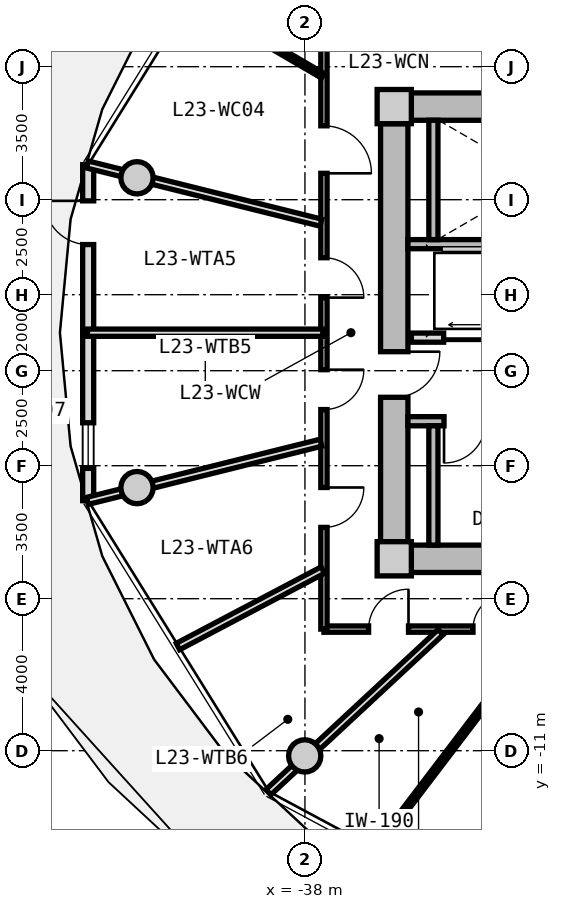
"""IFC4 building model, lengths in metres.
Left out: names, types, materials, properties, quantities, classifications, styles, units other than length and angle.
Written with IfcOpenShell. Run it as: python <this file> out.ifc"""

import sys

from ifc_helpers import new_model, si_unit, direction, frame, frame_2d, origin, origin_2d, place, context, subcontext, project, spatial, rectangle, circle, extrude, source, transform, mapped, element, fill, save


model = new_model("IFC4")
c1 = context("Model", 3, precision=1e-05, world=origin(), true_north=direction((0.0, 1.0)))
c2 = subcontext(c1, "Body", "Model", "MODEL_VIEW")
j1 = project(units=[si_unit("LENGTHUNIT", "METRE"), si_unit("PLANEANGLEUNIT", "RADIAN")], contexts=[c1])
p1 = place(None, origin())
s1 = spatial("IfcSite", under=j1, at=p1, CompositionType="ELEMENT")
p2 = place(p1, origin())
s2 = spatial("IfcBuilding", under=s1, at=p2, CompositionType="ELEMENT")
p3 = place(p2, frame((0.0, 0.0, 77.95)))
s3 = spatial("IfcBuildingStorey", under=s2, at=p3, CompositionType="ELEMENT", Elevation=77.95)
m1 = source(origin(), c2, "Body", "SweptSolid", [
    extrude(rectangle(XDim=0.9, YDim=0.9, at=origin_2d()), origin(), (0.0, 0.0, 1.0), 3.05),
])
for number, where, z_axis, x_axis in (
    (1, (-35.65, -5.95, 0.0), (0.0, 0.0, 1.0), (1.0, 0.0, 0.0)),
    (2, (-35.65, 5.95, 0.0), (0.0, 0.0, 1.0), (1.0, 0.0, 0.0)),
):
    element("IfcColumn", number, at=place(p3, frame(where, z_axis=z_axis, x_axis=x_axis)), inside=s3, PredefinedType="COLUMN", context=c2, shape_type="MappedRepresentation", body=[
        mapped(m1, transform((0.0, 0.0, 0.0), x_axis=(1.0, 0.0, 0.0), y_axis=(0.0, 1.0, 0.0), z_axis=(0.0, 0.0, 1.0), scale=1.0)),
    ])
m2 = source(origin(), c2, "Body", "SweptSolid", [
    extrude(rectangle(XDim=14.4, YDim=0.72, at=frame_2d((7.2, 0.0))), origin(), (0.0, 0.0, 1.0), 2.79),
])
for number, where, z_axis, x_axis in (
    (3, (-35.2, 5.95, 0.0), (0.0, 0.0, 1.0), (1.0, 0.0, 0.0)),
    (4, (-20.8, -5.95, 0.0), (0.0, 0.0, 1.0), (-1.0, 0.0, 0.0)),
):
    element("IfcWall", number, at=place(p3, frame(where, z_axis=z_axis, x_axis=x_axis)), inside=s3, PredefinedType="SHEAR", context=c2, shape_type="MappedRepresentation", body=[
        mapped(m2, transform((0.0, 0.0, 0.0), x_axis=(1.0, 0.0, 0.0), y_axis=(0.0, 1.0, 0.0), z_axis=(0.0, 0.0, 1.0), scale=1.0)),
    ])
m3 = source(origin(), c2, "Body", "SweptSolid", [
    extrude(rectangle(XDim=11.0, YDim=0.72, at=frame_2d((5.5, 0.0))), origin(), (0.0, 0.0, 1.0), 2.79),
])
p4 = place(p3, frame((-35.65, -5.5, 0.0), z_axis=(0.0, 0.0, 1.0), x_axis=(0.0, 1.0, 0.0)))
e5 = element("IfcWall", 5, at=p4, inside=s3, PredefinedType="SHEAR", context=c2, shape_type="MappedRepresentation", body=[
    mapped(m3, transform((0.0, 0.0, 0.0), x_axis=(1.0, 0.0, 0.0), y_axis=(0.0, 1.0, 0.0), z_axis=(0.0, 0.0, 1.0), scale=1.0)),
])
p5 = place(p4, frame((3.8, 0.0, 0.0)))
e6 = element("IfcOpeningElement", 6, at=p5, cuts=e5, PredefinedType="OPENING", context=c2, shape_type="SweptSolid", body=[
    extrude(rectangle(XDim=1.2, YDim=2.15, at=frame_2d((0.6, 1.075))), frame((0.0, 0.37, 0.0), z_axis=(0.0, -1.0, 0.0), x_axis=(1.0, 0.0, 0.0)), (0.0, 0.0, 1.0), 0.74),
])
m4 = source(origin(), c2, "Body", "SweptSolid", [
    extrude(circle(Radius=0.425, at=origin_2d()), origin(), (0.0, 0.0, 1.0), 3.47),
])
for number, where, z_axis, x_axis in (
    (7, (-42.419, 4.076, -0.42), (0.0, 0.0, 1.0), (1.0, 0.0, 0.0)),
    (8, (-42.419, -4.076, -0.42), (0.0, 0.0, 1.0), (1.0, 0.0, 0.0)),
    (9, (-38.006, -11.137, -0.42), (0.0, 0.0, 1.0), (1.0, 0.0, 0.0)),
):
    element("IfcColumn", number, at=place(p3, frame(where, z_axis=z_axis, x_axis=x_axis)), inside=s3, PredefinedType="COLUMN", context=c2, shape_type="MappedRepresentation", body=[
        mapped(m4, transform((0.0, 0.0, 0.0), x_axis=(1.0, 0.0, 0.0), y_axis=(0.0, 1.0, 0.0), z_axis=(0.0, 0.0, 1.0), scale=1.0)),
    ])
m5 = source(origin(), c2, "Body", "SweptSolid", [
    extrude(rectangle(XDim=8.841, YDim=0.29, at=frame_2d((4.421, 0.0))), origin(), (0.0, 0.0, 1.0), 2.79),
])
p6 = place(p3, frame((-43.704, -4.421, 0.0), z_axis=(0.0, 0.0, 1.0), x_axis=(0.0, 1.0, 0.0)))
e10 = element("IfcWall", 10, at=p6, inside=s3, PredefinedType="SOLIDWALL", context=c2, shape_type="MappedRepresentation", body=[
    mapped(m5, transform((0.0, 0.0, 0.0), x_axis=(1.0, 0.0, 0.0), y_axis=(0.0, 1.0, 0.0), z_axis=(0.0, 0.0, 1.0), scale=1.0)),
])
p7 = place(p6, frame((6.74, 0.0, 0.0)))
e11 = element("IfcOpeningElement", 11, at=p7, cuts=e10, PredefinedType="OPENING", context=c2, shape_type="SweptSolid", body=[
    extrude(rectangle(XDim=1.15, YDim=2.25, at=frame_2d((0.575, 1.125))), frame((0.0, 0.155, 0.0), z_axis=(0.0, -1.0, 0.0), x_axis=(1.0, 0.0, 0.0)), (0.0, 0.0, 1.0), 0.31),
])
p8 = place(p6, frame((0.85, 0.0, 0.85)))
e12 = element("IfcOpeningElement", 12, at=p8, cuts=e10, PredefinedType="OPENING", context=c2, shape_type="SweptSolid", body=[
    extrude(rectangle(XDim=1.2, YDim=1.5, at=frame_2d((0.6, 0.75))), frame((0.0, 0.155, 0.0), z_axis=(0.0, -1.0, 0.0), x_axis=(1.0, 0.0, 0.0)), (0.0, 0.0, 1.0), 0.31),
])
m6 = source(origin(), c2, "Body", "SweptSolid", [
    extrude(rectangle(XDim=7.83, YDim=0.24, at=frame_2d((3.915, 0.0))), origin(), (0.0, 0.0, 1.0), 2.79),
])
p9 = place(p3, frame((-35.29, 2.33, 0.0), z_axis=(0.0, 0.0, 1.0), x_axis=(1.0, 0.0, 0.0)))
e13 = element("IfcWall", 13, at=p9, inside=s3, PredefinedType="PARTITIONING", context=c2, shape_type="MappedRepresentation", body=[
    mapped(m6, transform((0.0, 0.0, 0.0), x_axis=(1.0, 0.0, 0.0), y_axis=(0.0, 1.0, 0.0), z_axis=(0.0, 0.0, 1.0), scale=1.0)),
])
m7 = source(origin(), c2, "Body", "SweptSolid", [
    extrude(rectangle(XDim=3.14, YDim=0.24, at=frame_2d((1.57, 0.0))), origin(), (0.0, 0.0, 1.0), 2.79),
])
p10 = place(p3, frame((-34.62, 2.45, 0.0), z_axis=(0.0, 0.0, 1.0), x_axis=(0.0, 1.0, 0.0)))
e14 = element("IfcWall", 14, at=p10, inside=s3, PredefinedType="PARTITIONING", context=c2, shape_type="MappedRepresentation", body=[
    mapped(m7, transform((0.0, 0.0, 0.0), x_axis=(1.0, 0.0, 0.0), y_axis=(0.0, 1.0, 0.0), z_axis=(0.0, 0.0, 1.0), scale=1.0)),
])
p11 = place(p3, frame((-35.29, -2.33, 0.0), z_axis=(0.0, 0.0, 1.0), x_axis=(1.0, 0.0, 0.0)))
e15 = element("IfcWall", 15, at=p11, inside=s3, PredefinedType="PARTITIONING", context=c2, shape_type="MappedRepresentation", body=[
    mapped(m6, transform((0.0, 0.0, 0.0), x_axis=(1.0, 0.0, 0.0), y_axis=(0.0, 1.0, 0.0), z_axis=(0.0, 0.0, 1.0), scale=1.0)),
])
p12 = place(p11, frame((0.95, 0.0, 0.0)))
e16 = element("IfcOpeningElement", 16, at=p12, cuts=e15, PredefinedType="OPENING", context=c2, shape_type="SweptSolid", body=[
    extrude(rectangle(XDim=1.1, YDim=2.15, at=frame_2d((0.55, 1.075))), frame((0.0, 0.13, 0.0), z_axis=(0.0, -1.0, 0.0), x_axis=(1.0, 0.0, 0.0)), (0.0, 0.0, 1.0), 0.26),
])
p13 = place(p3, frame((-34.62, -5.59, 0.0), z_axis=(0.0, 0.0, 1.0), x_axis=(0.0, 1.0, 0.0)))
e17 = element("IfcWall", 17, at=p13, inside=s3, PredefinedType="PARTITIONING", context=c2, shape_type="MappedRepresentation", body=[
    mapped(m7, transform((0.0, 0.0, 0.0), x_axis=(1.0, 0.0, 0.0), y_axis=(0.0, 1.0, 0.0), z_axis=(0.0, 0.0, 1.0), scale=1.0)),
])
m8 = source(origin(), c2, "Body", "SweptSolid", [
    extrude(rectangle(XDim=7.62, YDim=0.24, at=frame_2d((3.81, 0.0))), origin(), (0.0, 0.0, 1.0), 2.775),
])
p14 = place(p3, frame((-35.2, -0.13, 0.0), z_axis=(0.0, 0.0, 1.0), x_axis=(1.0, 0.0, 0.0)))
e18 = element("IfcWall", 18, at=p14, inside=s3, PredefinedType="PARTITIONING", context=c2, shape_type="MappedRepresentation", body=[
    mapped(m8, transform((0.0, 0.0, 0.0), x_axis=(1.0, 0.0, 0.0), y_axis=(0.0, 1.0, 0.0), z_axis=(0.0, 0.0, 1.0), scale=1.0)),
])
p15 = place(p14, frame((6.22, 0.0, 0.0)))
e19 = element("IfcOpeningElement", 19, at=p15, cuts=e18, PredefinedType="OPENING", context=c2, shape_type="SweptSolid", body=[
    extrude(rectangle(XDim=1.0, YDim=2.1, at=frame_2d((0.5, 1.05))), frame((0.0, 0.13, 0.0), z_axis=(0.0, -1.0, 0.0), x_axis=(1.0, 0.0, 0.0)), (0.0, 0.0, 1.0), 0.26),
])
p16 = place(p14, frame((0.85, 0.0, 0.0)))
e20 = element("IfcOpeningElement", 20, at=p16, cuts=e18, PredefinedType="OPENING", context=c2, shape_type="SweptSolid", body=[
    extrude(rectangle(XDim=1.1, YDim=2.2, at=frame_2d((0.55, 1.1))), frame((0.0, 0.13, 0.0), z_axis=(0.0, -1.0, 0.0), x_axis=(1.0, 0.0, 0.0)), (0.0, 0.0, 1.0), 0.26),
])
p17 = place(p14, frame((3.85, 0.0, 0.0)))
e21 = element("IfcOpeningElement", 21, at=p17, cuts=e18, PredefinedType="OPENING", context=c2, shape_type="SweptSolid", body=[
    extrude(rectangle(XDim=1.1, YDim=2.2, at=frame_2d((0.55, 1.1))), frame((0.0, 0.13, 0.0), z_axis=(0.0, -1.0, 0.0), x_axis=(1.0, 0.0, 0.0)), (0.0, 0.0, 1.0), 0.26),
])
m9 = source(origin(), c2, "Body", "SweptSolid", [
    extrude(rectangle(XDim=19.0, YDim=0.165, at=frame_2d((9.5, 0.0))), origin(), (0.0, 0.0, 1.0), 2.775),
])
p18 = place(p3, frame((-18.5, -7.8, 0.0), z_axis=(0.0, 0.0, 1.0), x_axis=(-1.0, 0.0, 0.0)))
e22 = element("IfcWall", 22, at=p18, inside=s3, PredefinedType="PARTITIONING", context=c2, shape_type="MappedRepresentation", body=[
    mapped(m9, transform((0.0, 0.0, 0.0), x_axis=(1.0, 0.0, 0.0), y_axis=(0.0, 1.0, 0.0), z_axis=(0.0, 0.0, 1.0), scale=1.0)),
])
p19 = place(p18, frame((14.158, 0.0, 0.0)))
e23 = element("IfcOpeningElement", 23, at=p19, cuts=e22, PredefinedType="OPENING", context=c2, shape_type="SweptSolid", body=[
    extrude(rectangle(XDim=0.92, YDim=2.1, at=frame_2d((0.46, 1.05))), frame((0.0, 0.093, 0.0), z_axis=(0.0, -1.0, 0.0), x_axis=(1.0, 0.0, 0.0)), (0.0, 0.0, 1.0), 0.185),
])
p20 = place(p18, frame((11.01, 0.0, 0.0)))
e24 = element("IfcOpeningElement", 24, at=p20, cuts=e22, PredefinedType="OPENING", context=c2, shape_type="SweptSolid", body=[
    extrude(rectangle(XDim=0.92, YDim=2.1, at=frame_2d((0.46, 1.05))), frame((0.0, 0.093, 0.0), z_axis=(0.0, -1.0, 0.0), x_axis=(1.0, 0.0, 0.0)), (0.0, 0.0, 1.0), 0.185),
])
p21 = place(p18, frame((6.825, 0.0, 0.0)))
e25 = element("IfcOpeningElement", 25, at=p21, cuts=e22, PredefinedType="OPENING", context=c2, shape_type="SweptSolid", body=[
    extrude(rectangle(XDim=1.25, YDim=2.2, at=frame_2d((0.625, 1.1))), frame((0.0, 0.093, 0.0), z_axis=(0.0, -1.0, 0.0), x_axis=(1.0, 0.0, 0.0)), (0.0, 0.0, 1.0), 0.185),
])
p22 = place(p18, frame((2.106, 0.0, 0.0)))
e26 = element("IfcOpeningElement", 26, at=p22, cuts=e22, PredefinedType="OPENING", context=c2, shape_type="SweptSolid", body=[
    extrude(rectangle(XDim=1.25, YDim=2.2, at=frame_2d((0.625, 1.1))), frame((0.0, 0.093, 0.0), z_axis=(0.0, -1.0, 0.0), x_axis=(1.0, 0.0, 0.0)), (0.0, 0.0, 1.0), 0.185),
])
p23 = place(p18, frame((16.775, 0.0, 0.0)))
e27 = element("IfcOpeningElement", 27, at=p23, cuts=e22, PredefinedType="OPENING", context=c2, shape_type="SweptSolid", body=[
    extrude(rectangle(XDim=1.05, YDim=2.15, at=frame_2d((0.525, 1.075))), frame((0.0, 0.093, 0.0), z_axis=(0.0, -1.0, 0.0), x_axis=(1.0, 0.0, 0.0)), (0.0, 0.0, 1.0), 0.185),
])
m10 = source(origin(), c2, "Body", "SweptSolid", [
    extrude(rectangle(XDim=15.6, YDim=0.165, at=frame_2d((7.8, 0.0))), origin(), (0.0, 0.0, 1.0), 2.775),
])
p24 = place(p3, frame((-37.5, -7.8, 0.0), z_axis=(0.0, 0.0, 1.0), x_axis=(0.0, 1.0, 0.0)))
e28 = element("IfcWall", 28, at=p24, inside=s3, PredefinedType="PARTITIONING", context=c2, shape_type="MappedRepresentation", body=[
    mapped(m10, transform((0.0, 0.0, 0.0), x_axis=(1.0, 0.0, 0.0), y_axis=(0.0, 1.0, 0.0), z_axis=(0.0, 0.0, 1.0), scale=1.0)),
])
p25 = place(p24, frame((11.994, 0.0, 0.0)))
e29 = element("IfcOpeningElement", 29, at=p25, cuts=e28, PredefinedType="OPENING", context=c2, shape_type="SweptSolid", body=[
    extrude(rectangle(XDim=1.25, YDim=2.2, at=frame_2d((0.625, 1.1))), frame((0.0, 0.093, 0.0), z_axis=(0.0, -1.0, 0.0), x_axis=(1.0, 0.0, 0.0)), (0.0, 0.0, 1.0), 0.185),
])
p26 = place(p24, frame((8.723, 0.0, 0.0)))
e30 = element("IfcOpeningElement", 30, at=p26, cuts=e28, PredefinedType="OPENING", context=c2, shape_type="SweptSolid", body=[
    extrude(rectangle(XDim=1.05, YDim=2.15, at=frame_2d((0.525, 1.075))), frame((0.0, 0.093, 0.0), z_axis=(0.0, -1.0, 0.0), x_axis=(1.0, 0.0, 0.0)), (0.0, 0.0, 1.0), 0.185),
])
p27 = place(p24, frame((5.777, 0.0, 0.0)))
e31 = element("IfcOpeningElement", 31, at=p27, cuts=e28, PredefinedType="OPENING", context=c2, shape_type="SweptSolid", body=[
    extrude(rectangle(XDim=1.05, YDim=2.15, at=frame_2d((0.525, 1.075))), frame((0.0, 0.093, 0.0), z_axis=(0.0, -1.0, 0.0), x_axis=(1.0, 0.0, 0.0)), (0.0, 0.0, 1.0), 0.185),
])
p28 = place(p24, frame((2.676, 0.0, 0.0)))
e32 = element("IfcOpeningElement", 32, at=p28, cuts=e28, PredefinedType="OPENING", context=c2, shape_type="SweptSolid", body=[
    extrude(rectangle(XDim=1.05, YDim=2.15, at=frame_2d((0.525, 1.075))), frame((0.0, 0.093, 0.0), z_axis=(0.0, -1.0, 0.0), x_axis=(1.0, 0.0, 0.0)), (0.0, 0.0, 1.0), 0.185),
])
m11 = source(origin(), c2, "Body", "SweptSolid", [
    extrude(rectangle(XDim=6.187, YDim=0.19, at=frame_2d((3.093, 0.0))), origin(), (0.0, 0.0, 1.0), 2.275),
])
p29 = place(p3, frame((-34.429, -7.88, 0.0), z_axis=(0.0, 0.0, 1.0), x_axis=(-0.732501077882, -0.680765870841, 0.0)))
e33 = element("IfcWall", 33, at=p29, inside=s3, PredefinedType="PARTITIONING", context=c2, shape_type="MappedRepresentation", body=[
    mapped(m11, transform((0.0, 0.0, 0.0), x_axis=(1.0, 0.0, 0.0), y_axis=(0.0, 1.0, 0.0), z_axis=(0.0, 0.0, 1.0), scale=1.0)),
])
m12 = source(origin(), c2, "Body", "SweptSolid", [
    extrude(rectangle(XDim=7.243, YDim=0.14, at=frame_2d((3.621, 0.0))), origin(), (0.0, 0.0, 1.0), 2.775),
])
p30 = place(p3, frame((-31.774, -7.83, 0.0), z_axis=(0.0, 0.0, 1.0), x_axis=(-0.605111472002, -0.796140757939, 0.0)))
e34 = element("IfcWall", 34, at=p30, inside=s3, PredefinedType="PARTITIONING", context=c2, shape_type="MappedRepresentation", body=[
    mapped(m12, transform((0.0, 0.0, 0.0), x_axis=(1.0, 0.0, 0.0), y_axis=(0.0, 1.0, 0.0), z_axis=(0.0, 0.0, 1.0), scale=1.0)),
])
m13 = source(origin(), c2, "Body", "SweptSolid", [
    extrude(rectangle(XDim=6.331, YDim=0.19, at=frame_2d((3.165, 0.0))), origin(), (0.0, 0.0, 1.0), 2.275),
])
p31 = place(p3, frame((-37.58, 2.896, 0.0), z_axis=(0.0, 0.0, 1.0), x_axis=(-0.97036440661, 0.241646267062, 0.0)))
e35 = element("IfcWall", 35, at=p31, inside=s3, PredefinedType="PARTITIONING", context=c2, shape_type="MappedRepresentation", body=[
    mapped(m13, transform((0.0, 0.0, 0.0), x_axis=(1.0, 0.0, 0.0), y_axis=(0.0, 1.0, 0.0), z_axis=(0.0, 0.0, 1.0), scale=1.0)),
])
m14 = source(origin(), c2, "Body", "SweptSolid", [
    extrude(rectangle(XDim=2.172, YDim=0.14, at=frame_2d((1.086, 0.0))), origin(), (0.0, 0.0, 1.0), 2.775),
])
p32 = place(p3, frame((-37.53, 6.762, 0.0), z_axis=(0.0, 0.0, 1.0), x_axis=(-0.863562702562, 0.504241468688, 0.0)))
e36 = element("IfcWall", 36, at=p32, inside=s3, PredefinedType="PARTITIONING", context=c2, shape_type="MappedRepresentation", body=[
    mapped(m14, transform((0.0, 0.0, 0.0), x_axis=(1.0, 0.0, 0.0), y_axis=(0.0, 1.0, 0.0), z_axis=(0.0, 0.0, 1.0), scale=1.0)),
])
p33 = place(p3, frame((-37.58, -2.896, 0.0), z_axis=(0.0, 0.0, 1.0), x_axis=(-0.97036440661, -0.241646267062, 0.0)))
e37 = element("IfcWall", 37, at=p33, inside=s3, PredefinedType="PARTITIONING", context=c2, shape_type="MappedRepresentation", body=[
    mapped(m13, transform((0.0, 0.0, 0.0), x_axis=(1.0, 0.0, 0.0), y_axis=(0.0, 1.0, 0.0), z_axis=(0.0, 0.0, 1.0), scale=1.0)),
])
m15 = source(origin(), c2, "Body", "SweptSolid", [
    extrude(rectangle(XDim=6.193, YDim=0.19, at=frame_2d((3.097, 0.0))), origin(), (0.0, 0.0, 1.0), 2.775),
])
p34 = place(p3, frame((-37.53, 0.0, 0.0), z_axis=(0.0, 0.0, 1.0), x_axis=(-1.0, 0.0, 0.0)))
e38 = element("IfcWall", 38, at=p34, inside=s3, PredefinedType="PARTITIONING", context=c2, shape_type="MappedRepresentation", body=[
    mapped(m15, transform((0.0, 0.0, 0.0), x_axis=(1.0, 0.0, 0.0), y_axis=(0.0, 1.0, 0.0), z_axis=(0.0, 0.0, 1.0), scale=1.0)),
])
m16 = source(origin(), c2, "Body", "SweptSolid", [
    extrude(rectangle(XDim=4.31, YDim=0.19, at=frame_2d((2.155, 0.0))), origin(), (0.0, 0.0, 1.0), 2.775),
])
p35 = place(p3, frame((-37.53, -6.248, 0.0), z_axis=(0.0, 0.0, 1.0), x_axis=(-0.884459441503, -0.466617076773, 0.0)))
e39 = element("IfcWall", 39, at=p35, inside=s3, PredefinedType="PARTITIONING", context=c2, shape_type="MappedRepresentation", body=[
    mapped(m16, transform((0.0, 0.0, 0.0), x_axis=(1.0, 0.0, 0.0), y_axis=(0.0, 1.0, 0.0), z_axis=(0.0, 0.0, 1.0), scale=1.0)),
])
m17 = source(origin(), c2, "Body", "SweptSolid", [
    extrude(rectangle(XDim=1.15, YDim=2.25, at=frame_2d((0.575, 1.125))), frame((0.0, 0.025, 0.0), z_axis=(0.0, -1.0, 0.0), x_axis=(1.0, 0.0, 0.0)), (0.0, 0.0, 1.0), 0.05),
])
p36 = place(p7, origin())
e40 = element("IfcDoor", 40, at=p36, inside=s3, OperationType="SINGLE_SWING_RIGHT", PredefinedType="DOOR", context=c2, shape_type="MappedRepresentation", body=[
    mapped(m17, transform((0.0, 0.0, 0.0), x_axis=(1.0, 0.0, 0.0), y_axis=(0.0, 1.0, 0.0), z_axis=(0.0, 0.0, 1.0), scale=1.0)),
])
fill(e11, e40)
m18 = source(origin(), c2, "Body", "SweptSolid", [
    extrude(rectangle(XDim=1.2, YDim=1.5, at=frame_2d((0.6, 0.75))), frame((0.0, 0.03, 0.0), z_axis=(0.0, -1.0, 0.0), x_axis=(1.0, 0.0, 0.0)), (0.0, 0.0, 1.0), 0.06),
])
p37 = place(p8, origin())
e41 = element("IfcWindow", 41, at=p37, inside=s3, PartitioningType="SINGLE_PANEL", PredefinedType="WINDOW", context=c2, shape_type="MappedRepresentation", body=[
    mapped(m18, transform((0.0, 0.0, 0.0), x_axis=(1.0, 0.0, 0.0), y_axis=(0.0, 1.0, 0.0), z_axis=(0.0, 0.0, 1.0), scale=1.0)),
])
fill(e12, e41)
m19 = source(origin(), c2, "Body", "SweptSolid", [
    extrude(rectangle(XDim=1.1, YDim=2.15, at=frame_2d((0.55, 1.075))), frame((0.0, 0.025, 0.0), z_axis=(0.0, -1.0, 0.0), x_axis=(1.0, 0.0, 0.0)), (0.0, 0.0, 1.0), 0.05),
])
p38 = place(p12, frame((1.1, 0.0, 0.0), z_axis=(0.0, 0.0, 1.0), x_axis=(-1.0, 0.0, 0.0)))
e42 = element("IfcDoor", 42, at=p38, inside=s3, OperationType="SINGLE_SWING_RIGHT", PredefinedType="DOOR", context=c2, shape_type="MappedRepresentation", body=[
    mapped(m19, transform((0.0, 0.0, 0.0), x_axis=(1.0, 0.0, 0.0), y_axis=(0.0, 1.0, 0.0), z_axis=(0.0, 0.0, 1.0), scale=1.0)),
])
fill(e16, e42)
m20 = source(origin(), c2, "Body", "SweptSolid", [
    extrude(rectangle(XDim=1.2, YDim=2.15, at=frame_2d((0.6, 1.075))), frame((0.0, 0.025, 0.0), z_axis=(0.0, -1.0, 0.0), x_axis=(1.0, 0.0, 0.0)), (0.0, 0.0, 1.0), 0.05),
])
p39 = place(p5, frame((1.2, 0.0, 0.0), z_axis=(0.0, 0.0, 1.0), x_axis=(-1.0, 0.0, 0.0)))
e43 = element("IfcDoor", 43, at=p39, inside=s3, OperationType="SINGLE_SWING_LEFT", PredefinedType="DOOR", context=c2, shape_type="MappedRepresentation", body=[
    mapped(m20, transform((0.0, 0.0, 0.0), x_axis=(1.0, 0.0, 0.0), y_axis=(0.0, 1.0, 0.0), z_axis=(0.0, 0.0, 1.0), scale=1.0)),
])
fill(e6, e43)
m21 = source(origin(), c2, "Body", "SweptSolid", [
    extrude(rectangle(XDim=1.1, YDim=2.2, at=frame_2d((0.55, 1.1))), frame((0.0, 0.025, 0.0), z_axis=(0.0, -1.0, 0.0), x_axis=(1.0, 0.0, 0.0)), (0.0, 0.0, 1.0), 0.05),
])
p40 = place(p16, origin())
e44 = element("IfcDoor", 44, at=p40, inside=s3, OperationType="SLIDING_TO_LEFT", PredefinedType="DOOR", context=c2, shape_type="MappedRepresentation", body=[
    mapped(m21, transform((0.0, 0.0, 0.0), x_axis=(1.0, 0.0, 0.0), y_axis=(0.0, 1.0, 0.0), z_axis=(0.0, 0.0, 1.0), scale=1.0)),
])
fill(e20, e44)
m22 = source(origin(), c2, "Body", "SweptSolid", [
    extrude(rectangle(XDim=0.92, YDim=2.1, at=frame_2d((0.46, 1.05))), frame((0.0, 0.025, 0.0), z_axis=(0.0, -1.0, 0.0), x_axis=(1.0, 0.0, 0.0)), (0.0, 0.0, 1.0), 0.05),
])
p41 = place(p19, frame((0.92, 0.0, 0.0), z_axis=(0.0, 0.0, 1.0), x_axis=(-1.0, 0.0, 0.0)))
e45 = element("IfcDoor", 45, at=p41, inside=s3, OperationType="SINGLE_SWING_RIGHT", PredefinedType="DOOR", context=c2, shape_type="MappedRepresentation", body=[
    mapped(m22, transform((0.0, 0.0, 0.0), x_axis=(1.0, 0.0, 0.0), y_axis=(0.0, 1.0, 0.0), z_axis=(0.0, 0.0, 1.0), scale=1.0)),
])
fill(e23, e45)
m23 = source(origin(), c2, "Body", "SweptSolid", [
    extrude(rectangle(XDim=1.25, YDim=2.2, at=frame_2d((0.625, 1.1))), frame((0.0, 0.025, 0.0), z_axis=(0.0, -1.0, 0.0), x_axis=(1.0, 0.0, 0.0)), (0.0, 0.0, 1.0), 0.05),
])
p42 = place(p25, frame((1.25, 0.0, 0.0), z_axis=(0.0, 0.0, 1.0), x_axis=(-1.0, 0.0, 0.0)))
e46 = element("IfcDoor", 46, at=p42, inside=s3, OperationType="SINGLE_SWING_RIGHT", PredefinedType="DOOR", context=c2, shape_type="MappedRepresentation", body=[
    mapped(m23, transform((0.0, 0.0, 0.0), x_axis=(1.0, 0.0, 0.0), y_axis=(0.0, 1.0, 0.0), z_axis=(0.0, 0.0, 1.0), scale=1.0)),
])
fill(e29, e46)
m24 = source(origin(), c2, "Body", "SweptSolid", [
    extrude(rectangle(XDim=1.05, YDim=2.15, at=frame_2d((0.525, 1.075))), frame((0.0, 0.025, 0.0), z_axis=(0.0, -1.0, 0.0), x_axis=(1.0, 0.0, 0.0)), (0.0, 0.0, 1.0), 0.05),
])
p43 = place(p26, frame((1.05, 0.0, 0.0), z_axis=(0.0, 0.0, 1.0), x_axis=(-1.0, 0.0, 0.0)))
e47 = element("IfcDoor", 47, at=p43, inside=s3, OperationType="SINGLE_SWING_RIGHT", PredefinedType="DOOR", context=c2, shape_type="MappedRepresentation", body=[
    mapped(m24, transform((0.0, 0.0, 0.0), x_axis=(1.0, 0.0, 0.0), y_axis=(0.0, 1.0, 0.0), z_axis=(0.0, 0.0, 1.0), scale=1.0)),
])
fill(e30, e47)
p44 = place(p27, frame((1.05, 0.0, 0.0), z_axis=(0.0, 0.0, 1.0), x_axis=(-1.0, 0.0, 0.0)))
e48 = element("IfcDoor", 48, at=p44, inside=s3, OperationType="SINGLE_SWING_LEFT", PredefinedType="DOOR", context=c2, shape_type="MappedRepresentation", body=[
    mapped(m24, transform((0.0, 0.0, 0.0), x_axis=(1.0, 0.0, 0.0), y_axis=(0.0, 1.0, 0.0), z_axis=(0.0, 0.0, 1.0), scale=1.0)),
])
fill(e31, e48)
p45 = place(p28, frame((1.05, 0.0, 0.0), z_axis=(0.0, 0.0, 1.0), x_axis=(-1.0, 0.0, 0.0)))
e49 = element("IfcDoor", 49, at=p45, inside=s3, OperationType="SINGLE_SWING_LEFT", PredefinedType="DOOR", context=c2, shape_type="MappedRepresentation", body=[
    mapped(m24, transform((0.0, 0.0, 0.0), x_axis=(1.0, 0.0, 0.0), y_axis=(0.0, 1.0, 0.0), z_axis=(0.0, 0.0, 1.0), scale=1.0)),
])
fill(e32, e49)
p46 = place(p23, frame((1.05, 0.0, 0.0), z_axis=(0.0, 0.0, 1.0), x_axis=(-1.0, 0.0, 0.0)))
e50 = element("IfcDoor", 50, at=p46, inside=s3, OperationType="SINGLE_SWING_RIGHT", PredefinedType="DOOR", context=c2, shape_type="MappedRepresentation", body=[
    mapped(m24, transform((0.0, 0.0, 0.0), x_axis=(1.0, 0.0, 0.0), y_axis=(0.0, 1.0, 0.0), z_axis=(0.0, 0.0, 1.0), scale=1.0)),
])
fill(e27, e50)
save(model, sys.argv[1])
